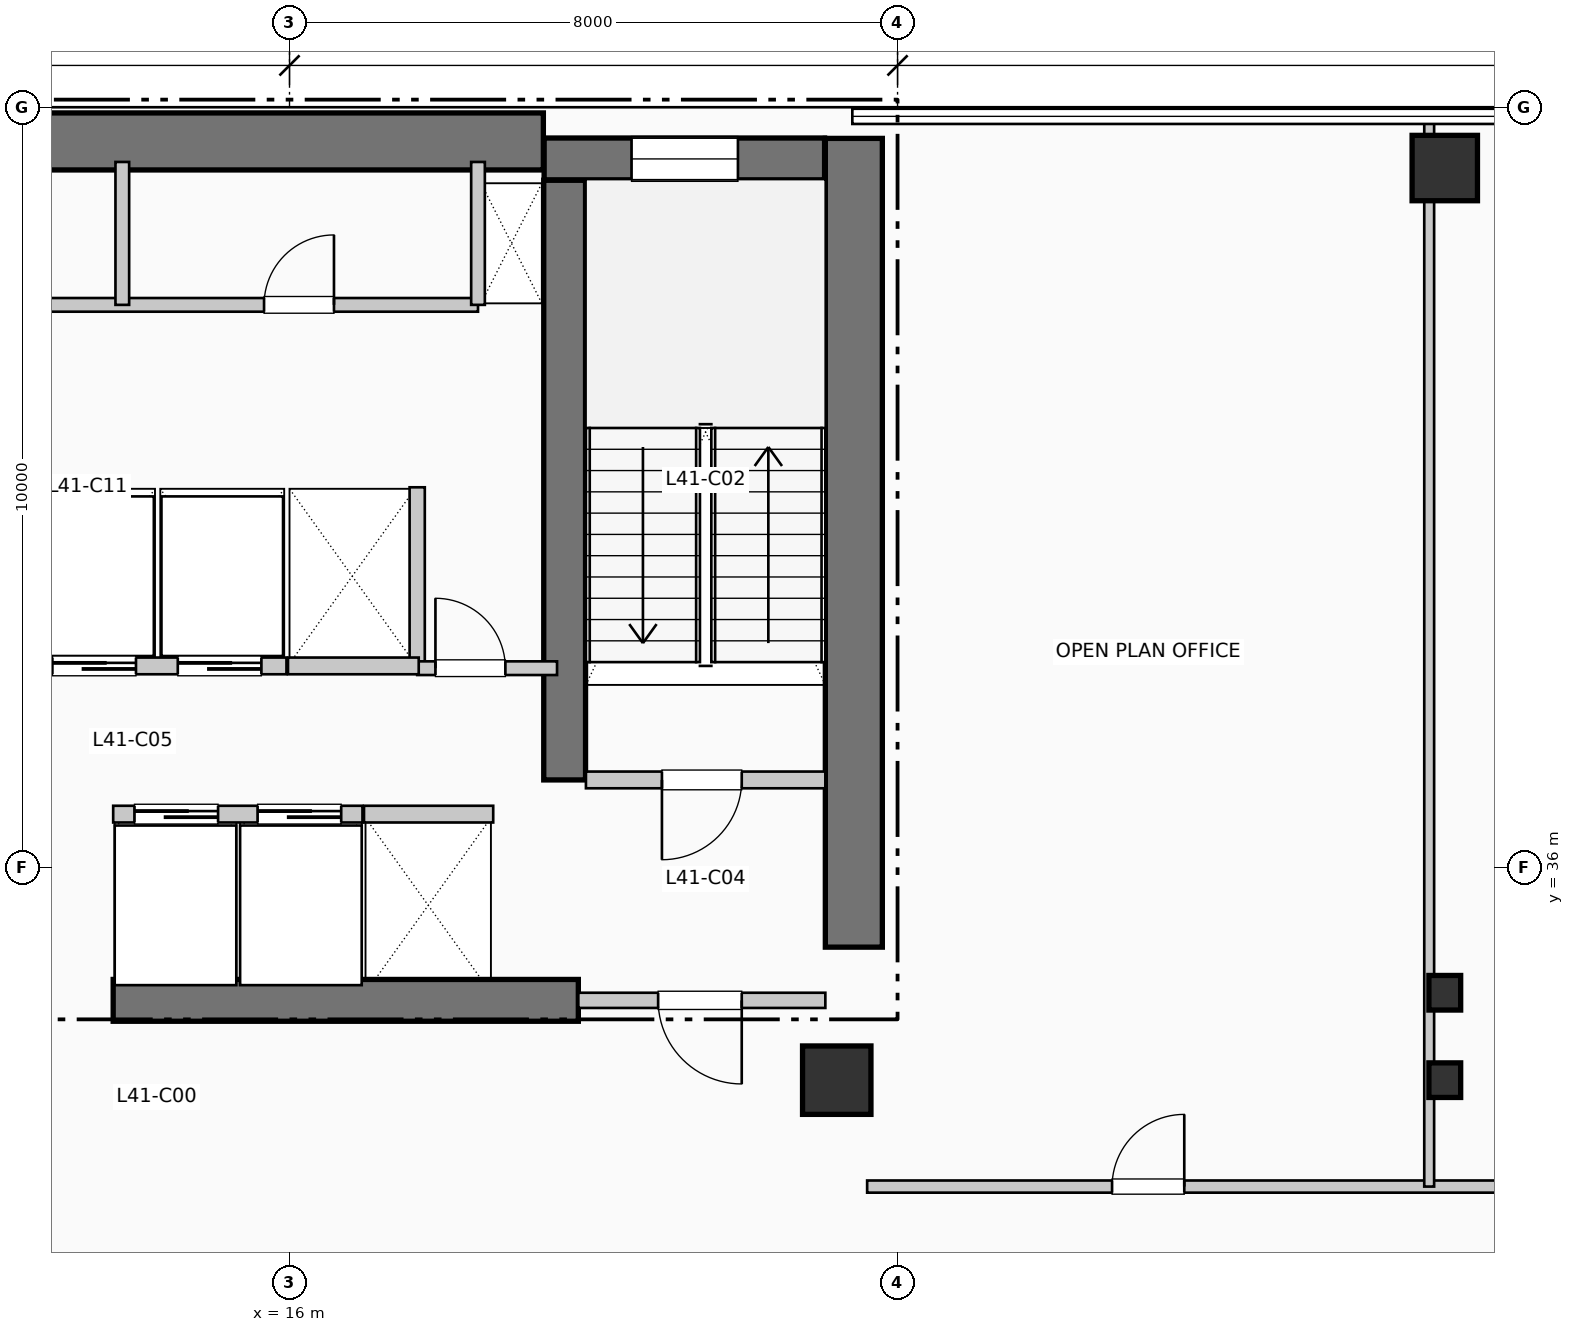
"""IFC4 building model, lengths in metres.
Left out: names, types, materials, properties, quantities, classifications, styles, units other than length and angle.
Written with IfcOpenShell. Run it as: python <this file> out.ifc"""

import sys

from ifc_helpers import new_model, si_unit, direction, frame, frame_2d, origin, origin_2d, place, context, subcontext, project, spatial, rectangle, i_section, extrude, element, fill, save


model = new_model("IFC4")
c1 = context("Model", 3, precision=1e-05, world=origin(), true_north=direction((0.0, 1.0)))
c2 = subcontext(c1, "Body", "Model", "MODEL_VIEW")
j1 = project(units=[si_unit("LENGTHUNIT", "METRE"), si_unit("PLANEANGLEUNIT", "RADIAN")], contexts=[c1])
p1 = place(None, origin())
s1 = spatial("IfcSite", under=j1, at=p1, CompositionType="ELEMENT")
p2 = place(p1, origin())
s2 = spatial("IfcBuilding", under=s1, at=p2, CompositionType="ELEMENT")
p3 = place(p2, frame((0.0, 0.0, 170.61)))
s3 = spatial("IfcBuildingStorey", under=s2, at=p3, CompositionType="ELEMENT", Elevation=170.61)
p4 = place(p3, frame((5.36, 45.55, 0.0), z_axis=(0.0, 0.0, 1.0), x_axis=(1.0, 0.0, 0.0)))
e1 = element("IfcWall", 1, at=p4, inside=s3, PredefinedType="SHEAR", context=c2, shape_type="SweptSolid", body=[
    extrude(rectangle(XDim=13.98, YDim=0.75, at=frame_2d((6.99, 0.0))), origin(), (0.0, 0.0, 1.0), 3.96),
])
p5 = place(p3, frame((23.425, 34.95, 0.0), z_axis=(0.0, 0.0, 1.0), x_axis=(0.0, 1.0, 0.0)))
e2 = element("IfcWall", 2, at=p5, inside=s3, PredefinedType="SHEAR", context=c2, shape_type="SweptSolid", body=[
    extrude(rectangle(XDim=10.64, YDim=0.75, at=frame_2d((5.32, 0.0))), origin(), (0.0, 0.0, 1.0), 3.96),
])
p6 = place(p3, frame((13.68, 34.25, 0.0), z_axis=(0.0, 0.0, 1.0), x_axis=(1.0, 0.0, 0.0)))
e3 = element("IfcWall", 3, at=p6, inside=s3, PredefinedType="SHEAR", context=c2, shape_type="SweptSolid", body=[
    extrude(rectangle(XDim=6.12, YDim=0.55, at=frame_2d((3.06, 0.0))), origin(), (0.0, 0.0, 1.0), 3.96),
])
p7 = place(p3, frame((19.62, 37.15, 0.0), z_axis=(0.0, 0.0, 1.0), x_axis=(0.0, 1.0, 0.0)))
e4 = element("IfcWall", 4, at=p7, inside=s3, PredefinedType="SHEAR", context=c2, shape_type="SweptSolid", body=[
    extrude(rectangle(XDim=7.89, YDim=0.55, at=frame_2d((3.945, 0.0))), origin(), (0.0, 0.0, 1.0), 3.96),
])
p8 = place(p3, frame((19.35, 45.32, 0.0), z_axis=(0.0, 0.0, 1.0), x_axis=(1.0, 0.0, 0.0)))
e5 = element("IfcWall", 5, at=p8, inside=s3, PredefinedType="SHEAR", context=c2, shape_type="SweptSolid", body=[
    extrude(rectangle(XDim=3.69, YDim=0.55, at=frame_2d((1.845, 0.0))), origin(), (0.0, 0.0, 1.0), 3.96),
])
p9 = place(p8, frame((1.15, 0.0, 1.05)))
e6 = element("IfcOpeningElement", 6, at=p9, cuts=e5, PredefinedType="OPENING", context=c2, shape_type="SweptSolid", body=[
    extrude(rectangle(XDim=1.4, YDim=1.8, at=frame_2d((0.7, 0.9))), frame((0.0, 0.285, 0.0), z_axis=(0.0, -1.0, 0.0), x_axis=(1.0, 0.0, 0.0)), (0.0, 0.0, 1.0), 0.57),
])
p10 = place(p3, frame((23.2, 33.2, 0.0), z_axis=(0.0, 0.0, 1.0), x_axis=(1.0, 0.0, 0.0)))
e7 = element("IfcColumn", 7, at=p10, inside=s3, PredefinedType="COLUMN", context=c2, shape_type="SweptSolid", body=[
    extrude(rectangle(XDim=0.9, YDim=0.9, at=origin_2d()), origin(), (0.0, 0.0, 1.0), 3.96),
])
for number, where, z_axis, x_axis in (
    (8, (31.2, 33.2, 0.0), (0.0, 0.0, 1.0), (1.0, 0.0, 0.0)),
    (9, (31.2, 34.35, 0.0), (0.0, 0.0, 1.0), (1.0, 0.0, 0.0)),
):
    element("IfcColumn", number, at=place(p3, frame(where, z_axis=z_axis, x_axis=x_axis)), inside=s3, PredefinedType="COLUMN", context=c2, shape_type="SweptSolid", body=[
        extrude(i_section(OverallWidth=0.418, OverallDepth=0.455, WebThickness=0.032, FlangeThickness=0.051, at=origin_2d()), origin(), (0.0, 0.0, 1.0), 3.96),
    ])
p11 = place(p3, frame((31.2, 45.2, 0.0), z_axis=(0.0, 0.0, 1.0), x_axis=(1.0, 0.0, 0.0)))
e10 = element("IfcColumn", 10, at=p11, inside=s3, PredefinedType="COLUMN", context=c2, shape_type="SweptSolid", body=[
    extrude(rectangle(XDim=0.86, YDim=0.86, at=origin_2d()), origin(), (0.0, 0.0, 1.0), 3.96),
])
p12 = place(p3, frame((19.9, 37.15, 0.0), z_axis=(0.0, 0.0, 1.0), x_axis=(1.0, 0.0, 0.0)))
e11 = element("IfcWall", 11, at=p12, inside=s3, PredefinedType="PARTITIONING", context=c2, shape_type="SweptSolid", body=[
    extrude(rectangle(XDim=3.15, YDim=0.22, at=frame_2d((1.575, 0.0))), origin(), (0.0, 0.0, 1.0), 3.61),
])
p13 = place(p12, frame((2.05, 0.0, 0.0), z_axis=(0.0, 0.0, 1.0), x_axis=(-1.0, 0.0, 0.0)))
e12 = element("IfcOpeningElement", 12, at=p13, cuts=e11, PredefinedType="OPENING", context=c2, shape_type="SweptSolid", body=[
    extrude(rectangle(XDim=1.05, YDim=2.15, at=frame_2d((0.525, 1.075))), frame((0.0, 0.12, 0.0), z_axis=(0.0, -1.0, 0.0), x_axis=(1.0, 0.0, 0.0)), (0.0, 0.0, 1.0), 0.24),
])
p14 = place(p3, frame((19.8, 34.25, 0.0), z_axis=(0.0, 0.0, 1.0), x_axis=(1.0, 0.0, 0.0)))
e13 = element("IfcWall", 13, at=p14, inside=s3, PredefinedType="PARTITIONING", context=c2, shape_type="SweptSolid", body=[
    extrude(rectangle(XDim=3.25, YDim=0.2, at=frame_2d((1.625, 0.0))), origin(), (0.0, 0.0, 1.0), 3.61),
])
p15 = place(p14, frame((2.15, 0.0, 0.0), z_axis=(0.0, 0.0, 1.0), x_axis=(-1.0, 0.0, 0.0)))
e14 = element("IfcOpeningElement", 14, at=p15, cuts=e13, PredefinedType="OPENING", context=c2, shape_type="SweptSolid", body=[
    extrude(rectangle(XDim=1.1, YDim=2.15, at=frame_2d((0.55, 1.075))), frame((0.0, 0.11, 0.0), z_axis=(0.0, -1.0, 0.0), x_axis=(1.0, 0.0, 0.0)), (0.0, 0.0, 1.0), 0.22),
])
p16 = place(p3, frame((17.68, 38.65, 0.0), z_axis=(0.0, 0.0, 1.0), x_axis=(0.0, 1.0, 0.0)))
e15 = element("IfcWall", 15, at=p16, inside=s3, PredefinedType="PARTITIONING", context=c2, shape_type="SweptSolid", body=[
    extrude(rectangle(XDim=2.35, YDim=0.2, at=frame_2d((1.175, 0.0))), origin(), (0.0, 0.0, 1.0), 3.61),
])
p17 = place(p3, frame((17.68, 38.62, 0.0), z_axis=(0.0, 0.0, 1.0), x_axis=(1.0, 0.0, 0.0)))
e16 = element("IfcWall", 16, at=p17, inside=s3, PredefinedType="PARTITIONING", context=c2, shape_type="SweptSolid", body=[
    extrude(rectangle(XDim=1.84, YDim=0.18, at=frame_2d((0.92, 0.0))), origin(), (0.0, 0.0, 1.0), 3.61),
])
p18 = place(p17, frame((0.24, 0.0, 0.0)))
e17 = element("IfcOpeningElement", 17, at=p18, cuts=e16, PredefinedType="OPENING", context=c2, shape_type="SweptSolid", body=[
    extrude(rectangle(XDim=0.92, YDim=2.1, at=frame_2d((0.46, 1.05))), frame((0.0, 0.1, 0.0), z_axis=(0.0, -1.0, 0.0), x_axis=(1.0, 0.0, 0.0)), (0.0, 0.0, 1.0), 0.2),
])
p19 = place(p3, frame((13.68, 36.7, 0.0), z_axis=(0.0, 0.0, 1.0), x_axis=(1.0, 0.0, 0.0)))
e18 = element("IfcWall", 18, at=p19, inside=s3, PredefinedType="PARTITIONING", context=c2, shape_type="SweptSolid", body=[
    extrude(rectangle(XDim=3.28, YDim=0.22, at=frame_2d((1.64, 0.0))), origin(), (0.0, 0.0, 1.0), 3.61),
])
p20 = place(p19, frame((0.28, 0.0, 0.0)))
e19 = element("IfcOpeningElement", 19, at=p20, cuts=e18, PredefinedType="OPENING", context=c2, shape_type="SweptSolid", body=[
    extrude(rectangle(XDim=1.1, YDim=2.2, at=frame_2d((0.55, 1.1))), frame((0.0, 0.12, 0.0), z_axis=(0.0, -1.0, 0.0), x_axis=(1.0, 0.0, 0.0)), (0.0, 0.0, 1.0), 0.24),
])
p21 = place(p19, frame((1.9, 0.0, 0.0)))
e20 = element("IfcOpeningElement", 20, at=p21, cuts=e18, PredefinedType="OPENING", context=c2, shape_type="SweptSolid", body=[
    extrude(rectangle(XDim=1.1, YDim=2.2, at=frame_2d((0.55, 1.1))), frame((0.0, 0.12, 0.0), z_axis=(0.0, -1.0, 0.0), x_axis=(1.0, 0.0, 0.0)), (0.0, 0.0, 1.0), 0.24),
])
p22 = place(p3, frame((12.58, 38.65, 0.0), z_axis=(0.0, 0.0, 1.0), x_axis=(1.0, 0.0, 0.0)))
e21 = element("IfcWall", 21, at=p22, inside=s3, PredefinedType="PARTITIONING", context=c2, shape_type="SweptSolid", body=[
    extrude(rectangle(XDim=3.38, YDim=0.22, at=frame_2d((1.69, 0.0))), origin(), (0.0, 0.0, 1.0), 3.61),
])
p23 = place(p22, frame((0.3, 0.0, 0.0)))
e22 = element("IfcOpeningElement", 22, at=p23, cuts=e21, PredefinedType="OPENING", context=c2, shape_type="SweptSolid", body=[
    extrude(rectangle(XDim=1.1, YDim=2.2, at=frame_2d((0.55, 1.1))), frame((0.0, 0.12, 0.0), z_axis=(0.0, -1.0, 0.0), x_axis=(1.0, 0.0, 0.0)), (0.0, 0.0, 1.0), 0.24),
])
p24 = place(p22, frame((1.95, 0.0, 0.0)))
e23 = element("IfcOpeningElement", 23, at=p24, cuts=e21, PredefinedType="OPENING", context=c2, shape_type="SweptSolid", body=[
    extrude(rectangle(XDim=1.1, YDim=2.2, at=frame_2d((0.55, 1.1))), frame((0.0, 0.12, 0.0), z_axis=(0.0, -1.0, 0.0), x_axis=(1.0, 0.0, 0.0)), (0.0, 0.0, 1.0), 0.24),
])
p25 = place(p3, frame((16.98, 36.7, 0.0), z_axis=(0.0, 0.0, 1.0), x_axis=(1.0, 0.0, 0.0)))
e24 = element("IfcWall", 24, at=p25, inside=s3, PredefinedType="PARTITIONING", context=c2, shape_type="SweptSolid", body=[
    extrude(rectangle(XDim=1.7, YDim=0.22, at=frame_2d((0.85, 0.0))), origin(), (0.0, 0.0, 1.0), 3.61),
])
p26 = place(p3, frame((15.98, 38.65, 0.0), z_axis=(0.0, 0.0, 1.0), x_axis=(1.0, 0.0, 0.0)))
e25 = element("IfcWall", 25, at=p26, inside=s3, PredefinedType="PARTITIONING", context=c2, shape_type="SweptSolid", body=[
    extrude(rectangle(XDim=1.72, YDim=0.22, at=frame_2d((0.86, 0.0))), origin(), (0.0, 0.0, 1.0), 3.61),
])
p27 = place(p3, frame((9.15, 43.4, 0.0), z_axis=(0.0, 0.0, 1.0), x_axis=(1.0, 0.0, 0.0)))
e26 = element("IfcWall", 26, at=p27, inside=s3, PredefinedType="PLUMBINGWALL", context=c2, shape_type="SweptSolid", body=[
    extrude(rectangle(XDim=9.33, YDim=0.18, at=frame_2d((4.665, 0.0))), origin(), (0.0, 0.0, 1.0), 3.61),
])
p28 = place(p27, frame((1.88, 0.0, 0.0)))
e27 = element("IfcOpeningElement", 27, at=p28, cuts=e26, PredefinedType="OPENING", context=c2, shape_type="SweptSolid", body=[
    extrude(rectangle(XDim=0.92, YDim=2.1, at=frame_2d((0.46, 1.05))), frame((0.0, 0.1, 0.0), z_axis=(0.0, -1.0, 0.0), x_axis=(1.0, 0.0, 0.0)), (0.0, 0.0, 1.0), 0.2),
])
p29 = place(p27, frame((6.515, 0.0, 0.0)))
e28 = element("IfcOpeningElement", 28, at=p29, cuts=e26, PredefinedType="OPENING", context=c2, shape_type="SweptSolid", body=[
    extrude(rectangle(XDim=0.92, YDim=2.1, at=frame_2d((0.46, 1.05))), frame((0.0, 0.1, 0.0), z_axis=(0.0, -1.0, 0.0), x_axis=(1.0, 0.0, 0.0)), (0.0, 0.0, 1.0), 0.2),
])
for number, where, z_axis, x_axis in (
    (29, (18.48, 43.4, 0.0), (0.0, 0.0, 1.0), (0.0, 1.0, 0.0)),
    (30, (13.8, 43.4, 0.0), (0.0, 0.0, 1.0), (0.0, 1.0, 0.0)),
):
    element("IfcWall", number, at=place(p3, frame(where, z_axis=z_axis, x_axis=x_axis)), inside=s3, PredefinedType="PLUMBINGWALL", context=c2, shape_type="SweptSolid", body=[
        extrude(rectangle(XDim=1.88, YDim=0.18, at=frame_2d((0.94, 0.0))), origin(), (0.0, 0.0, 1.0), 3.61),
    ])
p30 = place(p3, frame((23.6, 31.8, 0.0), z_axis=(0.0, 0.0, 1.0), x_axis=(1.0, 0.0, 0.0)))
e31 = element("IfcWall", 31, at=p30, inside=s3, PredefinedType="PARTITIONING", context=c2, shape_type="SweptSolid", body=[
    extrude(rectangle(XDim=26.41, YDim=0.16, at=frame_2d((13.205, 0.0))), origin(), (0.0, 0.0, 1.0), 3.61),
])
p31 = place(p30, frame((3.222, 0.0, 0.0)))
e32 = element("IfcOpeningElement", 32, at=p31, cuts=e31, PredefinedType="OPENING", context=c2, shape_type="SweptSolid", body=[
    extrude(rectangle(XDim=0.95, YDim=2.15, at=frame_2d((0.475, 1.075))), frame((0.0, 0.09, 0.0), z_axis=(0.0, -1.0, 0.0), x_axis=(1.0, 0.0, 0.0)), (0.0, 0.0, 1.0), 0.18),
])
p32 = place(p30, frame((12.146, 0.0, 0.0)))
e33 = element("IfcOpeningElement", 33, at=p32, cuts=e31, PredefinedType="OPENING", context=c2, shape_type="SweptSolid", body=[
    extrude(rectangle(XDim=0.95, YDim=2.15, at=frame_2d((0.475, 1.075))), frame((0.0, 0.09, 0.0), z_axis=(0.0, -1.0, 0.0), x_axis=(1.0, 0.0, 0.0)), (0.0, 0.0, 1.0), 0.18),
])
p33 = place(p30, frame((20.653, 0.0, 0.0)))
e34 = element("IfcOpeningElement", 34, at=p33, cuts=e31, PredefinedType="OPENING", context=c2, shape_type="SweptSolid", body=[
    extrude(rectangle(XDim=0.95, YDim=2.15, at=frame_2d((0.475, 1.075))), frame((0.0, 0.09, 0.0), z_axis=(0.0, -1.0, 0.0), x_axis=(1.0, 0.0, 0.0)), (0.0, 0.0, 1.0), 0.18),
])
p34 = place(p3, frame((30.995, 31.8, 0.0), z_axis=(0.0, 0.0, 1.0), x_axis=(0.0, 1.0, 0.0)))
e35 = element("IfcWall", 35, at=p34, inside=s3, PredefinedType="PARTITIONING", context=c2, shape_type="SweptSolid", body=[
    extrude(rectangle(XDim=14.01, YDim=0.13, at=frame_2d((7.005, 0.0))), origin(), (0.0, 0.0, 1.0), 2.945),
])
p35 = place(p9, origin())
e36 = element("IfcWindow", 36, at=p35, inside=s3, PartitioningType="SINGLE_PANEL", PredefinedType="WINDOW", context=c2, shape_type="SweptSolid", body=[
    extrude(rectangle(XDim=1.4, YDim=1.8, at=frame_2d((0.7, 0.9))), frame((0.0, 0.03, 0.0), z_axis=(0.0, -1.0, 0.0), x_axis=(1.0, 0.0, 0.0)), (0.0, 0.0, 1.0), 0.06),
])
fill(e6, e36)
p36 = place(p13, origin())
e37 = element("IfcDoor", 37, at=p36, inside=s3, OperationType="SINGLE_SWING_LEFT", PredefinedType="DOOR", context=c2, shape_type="SweptSolid", body=[
    extrude(rectangle(XDim=1.05, YDim=2.15, at=frame_2d((0.525, 1.075))), frame((0.0, 0.025, 0.0), z_axis=(0.0, -1.0, 0.0), x_axis=(1.0, 0.0, 0.0)), (0.0, 0.0, 1.0), 0.05),
])
fill(e12, e37)
p37 = place(p15, origin())
e38 = element("IfcDoor", 38, at=p37, inside=s3, OperationType="SINGLE_SWING_RIGHT", PredefinedType="DOOR", context=c2, shape_type="SweptSolid", body=[
    extrude(rectangle(XDim=1.1, YDim=2.15, at=frame_2d((0.55, 1.075))), frame((0.0, 0.025, 0.0), z_axis=(0.0, -1.0, 0.0), x_axis=(1.0, 0.0, 0.0)), (0.0, 0.0, 1.0), 0.05),
])
fill(e14, e38)
p38 = place(p18, origin())
e39 = element("IfcDoor", 39, at=p38, inside=s3, OperationType="SINGLE_SWING_LEFT", PredefinedType="DOOR", context=c2, shape_type="SweptSolid", body=[
    extrude(rectangle(XDim=0.92, YDim=2.1, at=frame_2d((0.46, 1.05))), frame((0.0, 0.025, 0.0), z_axis=(0.0, -1.0, 0.0), x_axis=(1.0, 0.0, 0.0)), (0.0, 0.0, 1.0), 0.05),
])
fill(e17, e39)
p39 = place(p20, origin())
e40 = element("IfcDoor", 40, at=p39, inside=s3, OperationType="SLIDING_TO_RIGHT", PredefinedType="DOOR", context=c2, shape_type="SweptSolid", body=[
    extrude(rectangle(XDim=1.1, YDim=2.2, at=frame_2d((0.55, 1.1))), frame((0.0, 0.025, 0.0), z_axis=(0.0, -1.0, 0.0), x_axis=(1.0, 0.0, 0.0)), (0.0, 0.0, 1.0), 0.05),
])
fill(e19, e40)
p40 = place(p21, origin())
e41 = element("IfcDoor", 41, at=p40, inside=s3, OperationType="SLIDING_TO_RIGHT", PredefinedType="DOOR", context=c2, shape_type="SweptSolid", body=[
    extrude(rectangle(XDim=1.1, YDim=2.2, at=frame_2d((0.55, 1.1))), frame((0.0, 0.025, 0.0), z_axis=(0.0, -1.0, 0.0), x_axis=(1.0, 0.0, 0.0)), (0.0, 0.0, 1.0), 0.05),
])
fill(e20, e41)
p41 = place(p23, origin())
e42 = element("IfcDoor", 42, at=p41, inside=s3, OperationType="SLIDING_TO_RIGHT", PredefinedType="DOOR", context=c2, shape_type="SweptSolid", body=[
    extrude(rectangle(XDim=1.1, YDim=2.2, at=frame_2d((0.55, 1.1))), frame((0.0, 0.025, 0.0), z_axis=(0.0, -1.0, 0.0), x_axis=(1.0, 0.0, 0.0)), (0.0, 0.0, 1.0), 0.05),
])
fill(e22, e42)
p42 = place(p24, origin())
e43 = element("IfcDoor", 43, at=p42, inside=s3, OperationType="SLIDING_TO_RIGHT", PredefinedType="DOOR", context=c2, shape_type="SweptSolid", body=[
    extrude(rectangle(XDim=1.1, YDim=2.2, at=frame_2d((0.55, 1.1))), frame((0.0, 0.025, 0.0), z_axis=(0.0, -1.0, 0.0), x_axis=(1.0, 0.0, 0.0)), (0.0, 0.0, 1.0), 0.05),
])
fill(e23, e43)
p43 = place(p29, origin())
e44 = element("IfcDoor", 44, at=p43, inside=s3, OperationType="SINGLE_SWING_RIGHT", PredefinedType="DOOR", context=c2, shape_type="SweptSolid", body=[
    extrude(rectangle(XDim=0.92, YDim=2.1, at=frame_2d((0.46, 1.05))), frame((0.0, 0.025, 0.0), z_axis=(0.0, -1.0, 0.0), x_axis=(1.0, 0.0, 0.0)), (0.0, 0.0, 1.0), 0.05),
])
fill(e28, e44)
p44 = place(p31, origin())
e45 = element("IfcDoor", 45, at=p44, inside=s3, OperationType="SINGLE_SWING_RIGHT", PredefinedType="DOOR", context=c2, shape_type="SweptSolid", body=[
    extrude(rectangle(XDim=0.95, YDim=2.15, at=frame_2d((0.475, 1.075))), frame((0.0, 0.025, 0.0), z_axis=(0.0, -1.0, 0.0), x_axis=(1.0, 0.0, 0.0)), (0.0, 0.0, 1.0), 0.05),
])
fill(e32, e45)
save(model, sys.argv[1])
